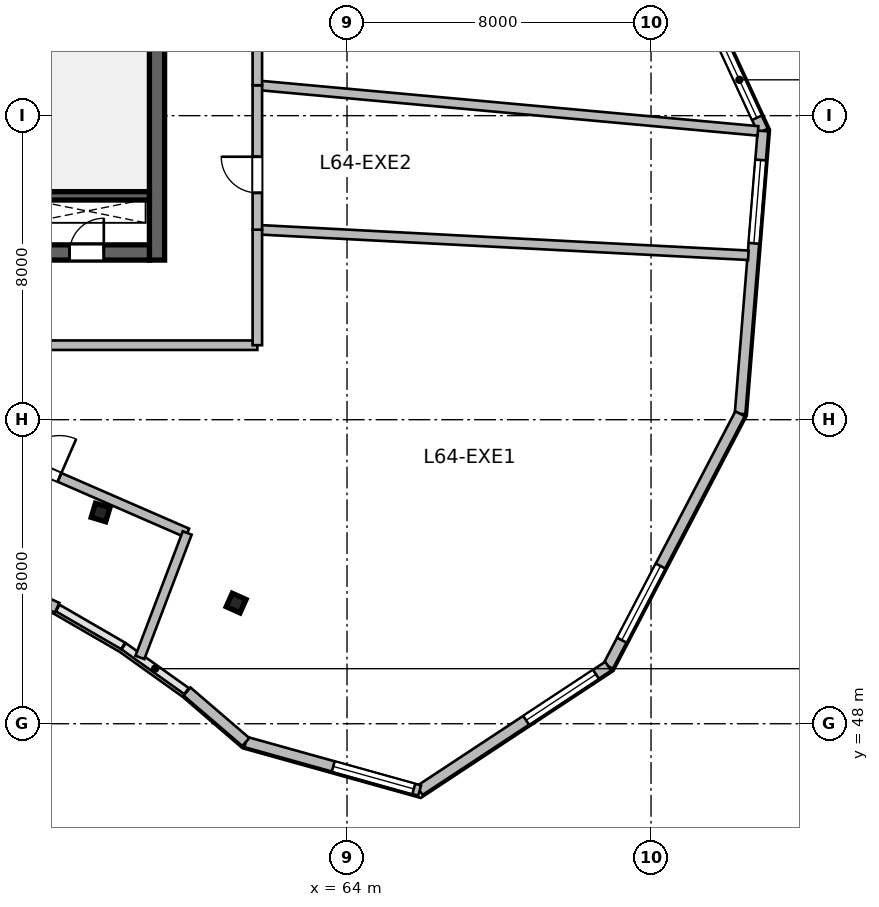
"""IFC4 building model, lengths in metres.
Left out: names, types, materials, properties, quantities, classifications, styles, units other than length and angle.
Written with IfcOpenShell. Run it as: python <this file> out.ifc"""

import sys

from ifc_helpers import new_model, si_unit, direction, frame, frame_2d, origin, origin_2d, place, context, subcontext, project, spatial, rectangle, i_section, extrude, source, transform, mapped, element, fill, save


model = new_model("IFC4")
c1 = context("Model", 3, precision=1e-05, world=origin(), true_north=direction((0.0, 1.0)))
c2 = subcontext(c1, "Body", "Model", "MODEL_VIEW")
j1 = project(units=[si_unit("LENGTHUNIT", "METRE"), si_unit("PLANEANGLEUNIT", "RADIAN")], contexts=[c1])
p1 = place(None, origin())
s1 = spatial("IfcSite", under=j1, at=p1, CompositionType="ELEMENT")
p2 = place(p1, origin())
s2 = spatial("IfcBuilding", under=s1, at=p2, CompositionType="ELEMENT")
p3 = place(p2, frame((0.0, 0.0, 264.0)))
s3 = spatial("IfcBuildingStorey", under=s2, at=p3, CompositionType="ELEMENT", Elevation=264.0)
m1 = source(origin(), c2, "Body", "SweptSolid", [
    extrude(rectangle(XDim=12.0, YDim=0.4, at=frame_2d((6.0, 0.0))), origin(), (0.0, 0.0, 1.0), 3.9),
])
p4 = place(p3, frame((59.0, 60.2, 0.0), z_axis=(0.0, 0.0, 1.0), x_axis=(0.0, 1.0, 0.0)))
e1 = element("IfcWall", 1, at=p4, inside=s3, PredefinedType="SHEAR", context=c2, shape_type="MappedRepresentation", body=[
    mapped(m1, transform((0.0, 0.0, 0.0), scale=1.0)),
])
m2 = source(origin(), c2, "Body", "SweptSolid", [
    extrude(rectangle(XDim=21.6, YDim=0.4, at=frame_2d((10.8, 0.0))), origin(), (0.0, 0.0, 1.0), 3.9),
])
p5 = place(p3, frame((37.2, 60.4, 0.0), z_axis=(0.0, 0.0, 1.0), x_axis=(1.0, 0.0, 0.0)))
e2 = element("IfcWall", 2, at=p5, inside=s3, PredefinedType="SHEAR", context=c2, shape_type="MappedRepresentation", body=[
    mapped(m2, transform((0.0, 0.0, 0.0), scale=1.0)),
])
p6 = place(p5, frame((1.1, 0.0, 0.0)))
e3 = element("IfcOpeningElement", 3, at=p6, cuts=e2, PredefinedType="OPENING", context=c2, shape_type="SweptSolid", body=[
    extrude(rectangle(XDim=1.15, YDim=2.15, at=frame_2d((0.575, 1.075))), frame((0.0, 0.21, 0.0), z_axis=(0.0, -1.0, 0.0), x_axis=(1.0, 0.0, 0.0)), (0.0, 0.0, 1.0), 0.42),
])
p7 = place(p5, frame((19.5, 0.0, 0.0)))
e4 = element("IfcOpeningElement", 4, at=p7, cuts=e2, PredefinedType="OPENING", context=c2, shape_type="SweptSolid", body=[
    extrude(rectangle(XDim=0.9, YDim=2.1, at=frame_2d((0.45, 1.05))), frame((0.0, 0.21, 0.0), z_axis=(0.0, -1.0, 0.0), x_axis=(1.0, 0.0, 0.0)), (0.0, 0.0, 1.0), 0.42),
])
p8 = place(p5, frame((12.02, 0.0, 0.0)))
e5 = element("IfcOpeningElement", 5, at=p8, cuts=e2, PredefinedType="OPENING", context=c2, shape_type="SweptSolid", body=[
    extrude(rectangle(XDim=1.6, YDim=2.15, at=frame_2d((0.8, 1.075))), frame((0.0, 0.21, 0.0), z_axis=(0.0, -1.0, 0.0), x_axis=(1.0, 0.0, 0.0)), (0.0, 0.0, 1.0), 0.42),
])
m3 = source(origin(), c2, "Body", "SweptSolid", [
    extrude(rectangle(XDim=3.27, YDim=0.22, at=frame_2d((1.635, 0.0))), origin(), (0.0, 0.0, 1.0), 3.9),
])
p9 = place(p3, frame((55.53, 61.89, 0.0), z_axis=(0.0, 0.0, 1.0), x_axis=(1.0, 0.0, 0.0)))
e6 = element("IfcWall", 6, at=p9, inside=s3, PredefinedType="SHEAR", context=c2, shape_type="MappedRepresentation", body=[
    mapped(m3, transform((0.0, 0.0, 0.0), scale=1.0)),
])
m4 = source(origin(), c2, "Body", "SweptSolid", [
    extrude(i_section(OverallWidth=0.399, OverallDepth=0.387, WebThickness=0.021, FlangeThickness=0.033, at=origin_2d()), origin(), (0.0, 0.0, 1.0), 3.9),
])
for number, where, z_axis, x_axis in (
    (7, (57.515, 53.558, 0.0), (0.0, 0.0, 1.0), (0.289, 0.957, 0.0)),
    (8, (61.082, 51.175, 0.0), (0.0, 0.0, 1.0), (0.409, 0.912, 0.0)),
):
    element("IfcColumn", number, at=place(p3, frame(where, z_axis=z_axis, x_axis=x_axis)), inside=s3, PredefinedType="COLUMN", context=c2, shape_type="MappedRepresentation", body=[
        mapped(m4, transform((0.0, 0.0, 0.0), scale=1.0)),
    ])
m5 = source(origin(), c2, "Body", "SweptSolid", [
    extrude(rectangle(XDim=5.928, YDim=0.28, at=frame_2d((2.964, 0.0))), origin(), (0.0, 0.0, 1.0), 3.65),
])
p10 = place(p3, frame((72.459, 68.979, 0.0), z_axis=(0.0, 0.0, 1.0), x_axis=(0.41942378221, -0.907790554543, 0.0)))
e9 = element("IfcWall", 9, at=p10, inside=s3, PredefinedType="SOLIDWALL", context=c2, shape_type="MappedRepresentation", body=[
    mapped(m5, transform((0.0, 0.0, 0.0), scale=1.0)),
])
p11 = place(p10, frame((3.346, 0.0, 0.95)))
e10 = element("IfcOpeningElement", 10, at=p11, cuts=e9, PredefinedType="OPENING", context=c2, shape_type="SweptSolid", body=[
    extrude(rectangle(XDim=2.2, YDim=2.1, at=frame_2d((1.1, 1.05))), frame((0.0, 0.15, 0.0), z_axis=(0.0, -1.0, 0.0), x_axis=(1.0, 0.0, 0.0)), (0.0, 0.0, 1.0), 0.3),
])
m6 = source(origin(), c2, "Body", "SweptSolid", [
    extrude(rectangle(XDim=7.466, YDim=0.28, at=frame_2d((3.733, 0.0))), origin(), (0.0, 0.0, 1.0), 3.65),
])
p12 = place(p3, frame((74.946, 63.597, 0.0), z_axis=(0.0, 0.0, 1.0), x_axis=(-0.080804454221, -0.996729973553, 0.0)))
e11 = element("IfcWall", 11, at=p12, inside=s3, PredefinedType="SOLIDWALL", context=c2, shape_type="MappedRepresentation", body=[
    mapped(m6, transform((0.0, 0.0, 0.0), scale=1.0)),
])
p13 = place(p12, frame((0.767, 0.0, 0.95)))
e12 = element("IfcOpeningElement", 12, at=p13, cuts=e11, PredefinedType="OPENING", context=c2, shape_type="SweptSolid", body=[
    extrude(rectangle(XDim=2.2, YDim=2.1, at=frame_2d((1.1, 1.05))), frame((0.0, 0.15, 0.0), z_axis=(0.0, -1.0, 0.0), x_axis=(1.0, 0.0, 0.0)), (0.0, 0.0, 1.0), 0.3),
])
m7 = source(origin(), c2, "Body", "SweptSolid", [
    extrude(rectangle(XDim=7.495, YDim=0.28, at=frame_2d((3.748, 0.0))), origin(), (0.0, 0.0, 1.0), 3.65),
])
p14 = place(p3, frame((74.343, 56.156, 0.0), z_axis=(0.0, 0.0, 1.0), x_axis=(-0.463116979657, -0.886297164135, 0.0)))
e13 = element("IfcWall", 13, at=p14, inside=s3, PredefinedType="SOLIDWALL", context=c2, shape_type="MappedRepresentation", body=[
    mapped(m7, transform((0.0, 0.0, 0.0), scale=1.0)),
])
p15 = place(p14, frame((4.521, 0.0, 0.95)))
e14 = element("IfcOpeningElement", 14, at=p15, cuts=e13, PredefinedType="OPENING", context=c2, shape_type="SweptSolid", body=[
    extrude(rectangle(XDim=2.2, YDim=2.1, at=frame_2d((1.1, 1.05))), frame((0.0, 0.15, 0.0), z_axis=(0.0, -1.0, 0.0), x_axis=(1.0, 0.0, 0.0)), (0.0, 0.0, 1.0), 0.3),
])
m8 = source(origin(), c2, "Body", "SweptSolid", [
    extrude(rectangle(XDim=5.942, YDim=0.28, at=frame_2d((2.971, 0.0))), origin(), (0.0, 0.0, 1.0), 3.65),
])
p16 = place(p3, frame((70.872, 49.513, 0.0), z_axis=(0.0, 0.0, 1.0), x_axis=(-0.834871099304, -0.550445499162, 0.0)))
e15 = element("IfcWall", 15, at=p16, inside=s3, PredefinedType="SOLIDWALL", context=c2, shape_type="MappedRepresentation", body=[
    mapped(m8, transform((0.0, 0.0, 0.0), scale=1.0)),
])
p17 = place(p16, frame((0.385, 0.0, 0.95)))
e16 = element("IfcOpeningElement", 16, at=p17, cuts=e15, PredefinedType="OPENING", context=c2, shape_type="SweptSolid", body=[
    extrude(rectangle(XDim=2.2, YDim=2.1, at=frame_2d((1.1, 1.05))), frame((0.0, 0.15, 0.0), z_axis=(0.0, -1.0, 0.0), x_axis=(1.0, 0.0, 0.0)), (0.0, 0.0, 1.0), 0.3),
])
m9 = source(origin(), c2, "Body", "SweptSolid", [
    extrude(rectangle(XDim=4.749, YDim=0.28, at=frame_2d((2.374, 0.0))), origin(), (0.0, 0.0, 1.0), 3.65),
])
p18 = place(p3, frame((65.91, 46.242, 0.0), z_axis=(0.0, 0.0, 1.0), x_axis=(-0.963210849911, 0.268746829961, 0.0)))
e17 = element("IfcWall", 17, at=p18, inside=s3, PredefinedType="SOLIDWALL", context=c2, shape_type="MappedRepresentation", body=[
    mapped(m9, transform((0.0, 0.0, 0.0), scale=1.0)),
])
p19 = place(p18, frame((0.16, 0.0, 0.95)))
e18 = element("IfcOpeningElement", 18, at=p19, cuts=e17, PredefinedType="OPENING", context=c2, shape_type="SweptSolid", body=[
    extrude(rectangle(XDim=2.2, YDim=2.1, at=frame_2d((1.1, 1.05))), frame((0.0, 0.15, 0.0), z_axis=(0.0, -1.0, 0.0), x_axis=(1.0, 0.0, 0.0)), (0.0, 0.0, 1.0), 0.3),
])
m10 = source(origin(), c2, "Body", "SweptSolid", [
    extrude(rectangle(XDim=2.04, YDim=0.28, at=frame_2d((1.02, 0.0))), origin(), (0.0, 0.0, 1.0), 3.65),
])
p20 = place(p3, frame((61.337, 47.519, 0.0), z_axis=(0.0, 0.0, 1.0), x_axis=(-0.758402847119, 0.651786101019, 0.0)))
e19 = element("IfcWall", 19, at=p20, inside=s3, PredefinedType="SOLIDWALL", context=c2, shape_type="MappedRepresentation", body=[
    mapped(m10, transform((0.0, 0.0, 0.0), scale=1.0)),
])
m11 = source(origin(), c2, "Body", "SweptSolid", [
    extrude(rectangle(XDim=1.95, YDim=0.28, at=frame_2d((0.975, 0.0))), origin(), (0.0, 0.0, 1.0), 3.65),
])
p21 = place(p3, frame((56.372, 51.052, 0.0), z_axis=(0.0, 0.0, 1.0), x_axis=(-0.910507945155, 0.413491574048, 0.0)))
e20 = element("IfcWall", 20, at=p21, inside=s3, PredefinedType="SOLIDWALL", context=c2, shape_type="MappedRepresentation", body=[
    mapped(m11, transform((0.0, 0.0, 0.0), scale=1.0)),
])
m12 = source(origin(), c2, "Body", "SweptSolid", [
    extrude(rectangle(XDim=8.431, YDim=0.25, at=frame_2d((4.216, 0.0))), origin(), (0.0, 0.0, 1.0), 3.65),
])
p22 = place(p3, frame((52.064, 56.385, 0.0), z_axis=(0.0, 0.0, 1.0), x_axis=(0.916868304583, -0.399189819574, 0.0)))
e21 = element("IfcWall", 21, at=p22, inside=s3, PredefinedType="PARTITIONING", context=c2, shape_type="MappedRepresentation", body=[
    mapped(m12, transform((0.0, 0.0, 0.0), scale=1.0)),
])
p23 = place(p22, frame((3.666, 0.0, 0.0)))
e22 = element("IfcOpeningElement", 22, at=p23, cuts=e21, PredefinedType="OPENING", context=c2, shape_type="SweptSolid", body=[
    extrude(rectangle(XDim=1.1, YDim=2.15, at=frame_2d((0.55, 1.075))), frame((0.0, 0.135, 0.0), z_axis=(0.0, -1.0, 0.0), x_axis=(1.0, 0.0, 0.0)), (0.0, 0.0, 1.0), 0.27),
])
m13 = source(origin(), c2, "Body", "SweptSolid", [
    extrude(rectangle(XDim=3.502, YDim=0.25, at=frame_2d((1.751, 0.0))), origin(), (0.0, 0.0, 1.0), 3.65),
])
p24 = place(p3, frame((58.55, 49.746, 0.0), z_axis=(0.0, 0.0, 1.0), x_axis=(0.35542122772, 0.934706237749, 0.0)))
e23 = element("IfcWall", 23, at=p24, inside=s3, PredefinedType="PARTITIONING", context=c2, shape_type="MappedRepresentation", body=[
    mapped(m13, transform((0.0, 0.0, 0.0), scale=1.0)),
])
m14 = source(origin(), c2, "Body", "SweptSolid", [
    extrude(rectangle(XDim=12.39, YDim=0.25, at=frame_2d((6.195, 0.0))), origin(), (0.0, 0.0, 1.0), 3.65),
])
p25 = place(p3, frame((49.25, 57.96, 0.0), z_axis=(0.0, 0.0, 1.0), x_axis=(1.0, 0.0, 0.0)))
e24 = element("IfcWall", 24, at=p25, inside=s3, PredefinedType="PARTITIONING", context=c2, shape_type="MappedRepresentation", body=[
    mapped(m14, transform((0.0, 0.0, 0.0), scale=1.0)),
])
m15 = source(origin(), c2, "Body", "SweptSolid", [
    extrude(rectangle(XDim=12.938, YDim=0.25, at=frame_2d((6.469, 0.0))), origin(), (0.0, 0.0, 1.0), 3.65),
])
p26 = place(p3, frame((61.64, 61.0, 0.0), z_axis=(0.0, 0.0, 1.0), x_axis=(0.998643821866, -0.052062626215, 0.0)))
e25 = element("IfcWall", 25, at=p26, inside=s3, PredefinedType="PARTITIONING", context=c2, shape_type="MappedRepresentation", body=[
    mapped(m15, transform((0.0, 0.0, 0.0), scale=1.0)),
])
m16 = source(origin(), c2, "Body", "SweptSolid", [
    extrude(rectangle(XDim=3.04, YDim=0.25, at=frame_2d((1.52, 0.0))), origin(), (0.0, 0.0, 1.0), 3.65),
])
p27 = place(p3, frame((61.64, 57.96, 0.0), z_axis=(0.0, 0.0, 1.0), x_axis=(0.0, 1.0, 0.0)))
e26 = element("IfcWall", 26, at=p27, inside=s3, PredefinedType="PARTITIONING", context=c2, shape_type="MappedRepresentation", body=[
    mapped(m16, transform((0.0, 0.0, 0.0), scale=1.0)),
])
m17 = source(origin(), c2, "Body", "SweptSolid", [
    extrude(rectangle(XDim=13.228, YDim=0.25, at=frame_2d((6.614, 0.0))), origin(), (0.0, 0.0, 1.0), 3.65),
])
p28 = place(p3, frame((61.64, 64.8, 0.0), z_axis=(0.0, 0.0, 1.0), x_axis=(0.995868510157, -0.090806995755, 0.0)))
e27 = element("IfcWall", 27, at=p28, inside=s3, PredefinedType="PARTITIONING", context=c2, shape_type="MappedRepresentation", body=[
    mapped(m17, transform((0.0, 0.0, 0.0), scale=1.0)),
])
m18 = source(origin(), c2, "Body", "SweptSolid", [
    extrude(rectangle(XDim=3.8, YDim=0.25, at=frame_2d((1.9, 0.0))), origin(), (0.0, 0.0, 1.0), 3.65),
])
p29 = place(p3, frame((61.64, 61.0, 0.0), z_axis=(0.0, 0.0, 1.0), x_axis=(0.0, 1.0, 0.0)))
e28 = element("IfcWall", 28, at=p29, inside=s3, PredefinedType="PARTITIONING", context=c2, shape_type="MappedRepresentation", body=[
    mapped(m18, transform((0.0, 0.0, 0.0), scale=1.0)),
])
p30 = place(p29, frame((0.969, 0.0, 0.0)))
e29 = element("IfcOpeningElement", 29, at=p30, cuts=e28, PredefinedType="OPENING", context=c2, shape_type="SweptSolid", body=[
    extrude(rectangle(XDim=0.95, YDim=2.1, at=frame_2d((0.475, 1.05))), frame((0.0, 0.135, 0.0), z_axis=(0.0, -1.0, 0.0), x_axis=(1.0, 0.0, 0.0)), (0.0, 0.0, 1.0), 0.27),
])
m19 = source(origin(), c2, "Body", "SweptSolid", [
    extrude(rectangle(XDim=11.445, YDim=0.25, at=frame_2d((5.722, 0.0))), origin(), (0.0, 0.0, 1.0), 3.65),
])
p31 = place(p3, frame((61.64, 64.8, 0.0), z_axis=(0.0, 0.0, 1.0), x_axis=(0.0, 1.0, 0.0)))
e30 = element("IfcWall", 30, at=p31, inside=s3, PredefinedType="PARTITIONING", context=c2, shape_type="MappedRepresentation", body=[
    mapped(m19, transform((0.0, 0.0, 0.0), scale=1.0)),
])
p32 = place(p31, frame((5.247, 0.0, 0.0)))
e31 = element("IfcOpeningElement", 31, at=p32, cuts=e30, PredefinedType="OPENING", context=c2, shape_type="SweptSolid", body=[
    extrude(rectangle(XDim=0.95, YDim=2.1, at=frame_2d((0.475, 1.05))), frame((0.0, 0.135, 0.0), z_axis=(0.0, -1.0, 0.0), x_axis=(1.0, 0.0, 0.0)), (0.0, 0.0, 1.0), 0.27),
])
m20 = source(origin(), c2, "Body", "SweptSolid", [
    extrude(rectangle(XDim=2.2, YDim=2.1, at=frame_2d((1.1, 1.05))), frame((0.0, 0.03, 0.0), z_axis=(0.0, -1.0, 0.0), x_axis=(1.0, 0.0, 0.0)), (0.0, 0.0, 1.0), 0.06),
])
p33 = place(p11, origin())
e32 = element("IfcWindow", 32, at=p33, inside=s3, PartitioningType="TRIPLE_PANEL_VERTICAL", PredefinedType="WINDOW", context=c2, shape_type="MappedRepresentation", body=[
    mapped(m20, transform((0.0, 0.0, 0.0), scale=1.0)),
])
fill(e10, e32)
p34 = place(p13, origin())
e33 = element("IfcWindow", 33, at=p34, inside=s3, PartitioningType="TRIPLE_PANEL_VERTICAL", PredefinedType="WINDOW", context=c2, shape_type="MappedRepresentation", body=[
    mapped(m20, transform((0.0, 0.0, 0.0), scale=1.0)),
])
fill(e12, e33)
p35 = place(p15, origin())
e34 = element("IfcWindow", 34, at=p35, inside=s3, PartitioningType="TRIPLE_PANEL_VERTICAL", PredefinedType="WINDOW", context=c2, shape_type="MappedRepresentation", body=[
    mapped(m20, transform((0.0, 0.0, 0.0), scale=1.0)),
])
fill(e14, e34)
p36 = place(p17, origin())
e35 = element("IfcWindow", 35, at=p36, inside=s3, PartitioningType="TRIPLE_PANEL_VERTICAL", PredefinedType="WINDOW", context=c2, shape_type="MappedRepresentation", body=[
    mapped(m20, transform((0.0, 0.0, 0.0), scale=1.0)),
])
fill(e16, e35)
p37 = place(p19, origin())
e36 = element("IfcWindow", 36, at=p37, inside=s3, PartitioningType="TRIPLE_PANEL_VERTICAL", PredefinedType="WINDOW", context=c2, shape_type="MappedRepresentation", body=[
    mapped(m20, transform((0.0, 0.0, 0.0), scale=1.0)),
])
fill(e18, e36)
m21 = source(origin(), c2, "Body", "SweptSolid", [
    extrude(rectangle(XDim=0.9, YDim=2.1, at=frame_2d((0.45, 1.05))), frame((0.0, 0.025, 0.0), z_axis=(0.0, -1.0, 0.0), x_axis=(1.0, 0.0, 0.0)), (0.0, 0.0, 1.0), 0.05),
])
p38 = place(p7, origin())
e37 = element("IfcDoor", 37, at=p38, inside=s3, OperationType="SINGLE_SWING_RIGHT", PredefinedType="DOOR", context=c2, shape_type="MappedRepresentation", body=[
    mapped(m21, transform((0.0, 0.0, 0.0), scale=1.0)),
])
fill(e4, e37)
m22 = source(origin(), c2, "Body", "SweptSolid", [
    extrude(rectangle(XDim=1.1, YDim=2.15, at=frame_2d((0.55, 1.075))), frame((0.0, 0.025, 0.0), z_axis=(0.0, -1.0, 0.0), x_axis=(1.0, 0.0, 0.0)), (0.0, 0.0, 1.0), 0.05),
])
p39 = place(p23, origin())
e38 = element("IfcDoor", 38, at=p39, inside=s3, OperationType="SINGLE_SWING_RIGHT", PredefinedType="DOOR", context=c2, shape_type="MappedRepresentation", body=[
    mapped(m22, transform((0.0, 0.0, 0.0), scale=1.0)),
])
fill(e22, e38)
m23 = source(origin(), c2, "Body", "SweptSolid", [
    extrude(rectangle(XDim=0.95, YDim=2.1, at=frame_2d((0.475, 1.05))), frame((0.0, 0.025, 0.0), z_axis=(0.0, -1.0, 0.0), x_axis=(1.0, 0.0, 0.0)), (0.0, 0.0, 1.0), 0.05),
])
p40 = place(p30, origin())
e39 = element("IfcDoor", 39, at=p40, inside=s3, OperationType="SINGLE_SWING_RIGHT", PredefinedType="DOOR", context=c2, shape_type="MappedRepresentation", body=[
    mapped(m23, transform((0.0, 0.0, 0.0), scale=1.0)),
])
fill(e29, e39)
save(model, sys.argv[1])
